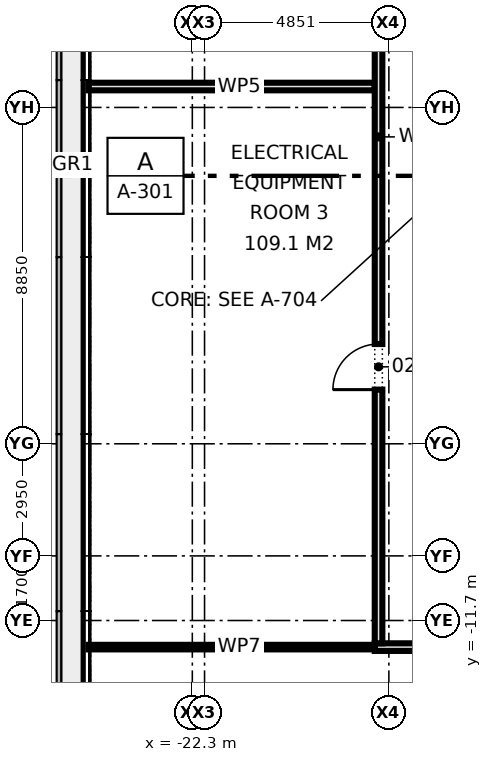
"""IFC4 building model, lengths in metres.
Left out: names, types, materials, properties, quantities, classifications, styles, units other than length and angle.
Written with IfcOpenShell. Run it as: python <this file> out.ifc"""

import sys

from ifc_helpers import new_model, si_unit, direction, frame, frame_2d, origin, place, context, subcontext, project, spatial, rectangle, extrude, element, fill, save


model = new_model("IFC4")
c1 = context("Model", 3, precision=1e-05, world=origin(), true_north=direction((0.0, 1.0)))
c2 = subcontext(c1, "Body", "Model", "MODEL_VIEW")
j1 = project(units=[si_unit("LENGTHUNIT", "METRE"), si_unit("PLANEANGLEUNIT", "RADIAN")], contexts=[c1])
p1 = place(None, origin())
s1 = spatial("IfcSite", under=j1, at=p1, CompositionType="ELEMENT")
p2 = place(p1, origin())
s2 = spatial("IfcBuilding", under=s1, at=p2, CompositionType="ELEMENT")
p3 = place(p2, frame((0.0, 0.0, 6.5)))
s3 = spatial("IfcBuildingStorey", under=s2, at=p3, CompositionType="ELEMENT", Elevation=6.5)
p4 = place(p3, frame((-17.5, -12.4, 0.0), z_axis=(0.0, 0.0, 1.0), x_axis=(1.0, 0.0, 0.0)))
e1 = element("IfcWall", 1, at=p4, inside=s3, PredefinedType="PARTITIONING", context=c2, shape_type="SweptSolid", body=[
    extrude(rectangle(XDim=17.6, YDim=0.2, at=frame_2d((8.8, 0.0))), origin(), (0.0, 0.0, 1.0), 4.575),
])
p5 = place(p4, frame((6.3, 0.0, 0.0)))
e2 = element("IfcOpeningElement", 2, at=p5, cuts=e1, PredefinedType="OPENING", context=c2, shape_type="SweptSolid", body=[
    extrude(rectangle(XDim=1.0, YDim=2.1, at=frame_2d((0.5, 1.05))), frame((0.0, 0.11, 0.0), z_axis=(0.0, -1.0, 0.0), x_axis=(1.0, 0.0, 0.0)), (0.0, 0.0, 1.0), 0.22),
])
p6 = place(p4, frame((9.9, 0.0, 0.0)))
e3 = element("IfcOpeningElement", 3, at=p6, cuts=e1, PredefinedType="OPENING", context=c2, shape_type="SweptSolid", body=[
    extrude(rectangle(XDim=1.0, YDim=2.1, at=frame_2d((0.5, 1.05))), frame((0.0, 0.11, 0.0), z_axis=(0.0, -1.0, 0.0), x_axis=(1.0, 0.0, 0.0)), (0.0, 0.0, 1.0), 0.22),
])
p7 = place(p4, frame((13.0, 0.0, 0.0)))
e4 = element("IfcOpeningElement", 4, at=p7, cuts=e1, PredefinedType="OPENING", context=c2, shape_type="SweptSolid", body=[
    extrude(rectangle(XDim=1.0, YDim=2.1, at=frame_2d((0.5, 1.05))), frame((0.0, 0.11, 0.0), z_axis=(0.0, -1.0, 0.0), x_axis=(1.0, 0.0, 0.0)), (0.0, 0.0, 1.0), 0.22),
])
p8 = place(p3, frame((-25.03, 2.35, 0.0), z_axis=(0.0, 0.0, 1.0), x_axis=(1.0, 0.0, 0.0)))
e5 = element("IfcWall", 5, at=p8, inside=s3, PredefinedType="PARTITIONING", context=c2, shape_type="SweptSolid", body=[
    extrude(rectangle(XDim=7.53, YDim=0.2, at=frame_2d((3.765, 0.0))), origin(), (0.0, 0.0, 1.0), 4.575),
])
p9 = place(p3, frame((-17.4, -12.3, 0.0), z_axis=(0.0, 0.0, 1.0), x_axis=(0.0, 1.0, 0.0)))
e6 = element("IfcWall", 6, at=p9, inside=s3, PredefinedType="PARTITIONING", context=c2, shape_type="SweptSolid", body=[
    extrude(rectangle(XDim=24.6, YDim=0.2, at=frame_2d((12.3, 0.0))), origin(), (0.0, 0.0, 1.0), 4.575),
])
p10 = place(p9, frame((6.675, 0.0, 0.0)))
e7 = element("IfcOpeningElement", 7, at=p10, cuts=e6, PredefinedType="OPENING", context=c2, shape_type="SweptSolid", body=[
    extrude(rectangle(XDim=1.2, YDim=2.1, at=frame_2d((0.6, 1.05))), frame((0.0, 0.11, 0.0), z_axis=(0.0, -1.0, 0.0), x_axis=(1.0, 0.0, 0.0)), (0.0, 0.0, 1.0), 0.22),
])
p11 = place(p9, frame((18.775, 0.0, 0.0)))
e8 = element("IfcOpeningElement", 8, at=p11, cuts=e6, PredefinedType="OPENING", context=c2, shape_type="SweptSolid", body=[
    extrude(rectangle(XDim=1.8, YDim=2.1, at=frame_2d((0.9, 1.05))), frame((0.0, 0.11, 0.0), z_axis=(0.0, -1.0, 0.0), x_axis=(1.0, 0.0, 0.0)), (0.0, 0.0, 1.0), 0.22),
])
p12 = place(p3, frame((-25.03, -12.4, 0.0), z_axis=(0.0, 0.0, 1.0), x_axis=(1.0, 0.0, 0.0)))
e9 = element("IfcWall", 9, at=p12, inside=s3, PredefinedType="PARTITIONING", context=c2, shape_type="SweptSolid", body=[
    extrude(rectangle(XDim=7.53, YDim=0.12, at=frame_2d((3.765, 0.0))), origin(), (0.0, 0.0, 1.0), 4.575),
])
p13 = place(p10, origin())
e10 = element("IfcDoor", 10, at=p13, inside=s3, OperationType="SINGLE_SWING_LEFT", PredefinedType="DOOR", context=c2, shape_type="SweptSolid", body=[
    extrude(rectangle(XDim=1.2, YDim=2.1, at=frame_2d((0.6, 1.05))), frame((0.0, 0.025, 0.0), z_axis=(0.0, -1.0, 0.0), x_axis=(1.0, 0.0, 0.0)), (0.0, 0.0, 1.0), 0.05),
])
fill(e7, e10)
save(model, sys.argv[1])
